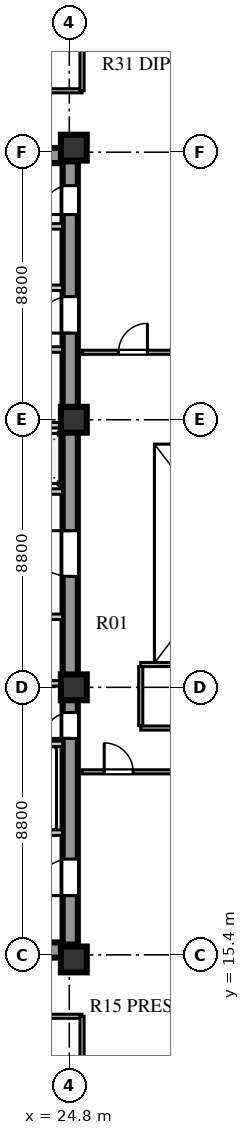
"""IFC4 building model, lengths in metres.
Left out: names, types, materials, properties, quantities, classifications, styles, units other than length and angle.
Written with IfcOpenShell. Run it as: python <this file> out.ifc"""

import sys

from ifc_helpers import new_model, si_unit, direction, frame, frame_2d, origin, origin_2d, place, context, subcontext, project, spatial, rectangle, extrude, element, fill, save


model = new_model("IFC4")
c1 = context("Model", 3, precision=1e-05, world=origin(), true_north=direction((0.0, 1.0)))
c2 = subcontext(c1, "Body", "Model", "MODEL_VIEW")
j1 = project(units=[si_unit("LENGTHUNIT", "METRE"), si_unit("PLANEANGLEUNIT", "RADIAN")], contexts=[c1])
p1 = place(None, origin())
s1 = spatial("IfcSite", under=j1, at=p1, CompositionType="ELEMENT")
p2 = place(p1, origin())
s2 = spatial("IfcBuilding", under=s1, at=p2, CompositionType="ELEMENT")
p3 = place(p2, frame((0.0, 0.0, 188.7)))
s3 = spatial("IfcBuildingStorey", under=s2, at=p3, CompositionType="ELEMENT", Elevation=188.7)
for number, where, z_axis, x_axis in (
    (1, (15.4, 15.56, 0.0), (0.0, 0.0, 1.0), (1.0, 0.0, 0.0)),
    (2, (15.4, 41.69, 0.0), (0.0, 0.0, 1.0), (1.0, 0.0, 0.0)),
):
    element("IfcWall", number, at=place(p3, frame(where, z_axis=z_axis, x_axis=x_axis)), inside=s3, PredefinedType="SHEAR", context=c2, shape_type="SweptSolid", body=[
        extrude(rectangle(XDim=9.68, YDim=0.5, at=frame_2d((4.84, 0.0))), origin(), (0.0, 0.0, 1.0), 3.6),
    ])
p4 = place(p3, frame((24.83, 15.74, 0.0), z_axis=(0.0, 0.0, 1.0), x_axis=(0.0, 1.0, 0.0)))
e3 = element("IfcWall", 3, at=p4, inside=s3, PredefinedType="SHEAR", context=c2, shape_type="SweptSolid", body=[
    extrude(rectangle(XDim=25.76, YDim=0.5, at=frame_2d((12.88, 0.0))), origin(), (0.0, 0.0, 1.0), 3.6),
])
p5 = place(p4, frame((1.61, 0.0, 0.0)))
e4 = element("IfcOpeningElement", 4, at=p5, cuts=e3, PredefinedType="OPENING", context=c2, shape_type="SweptSolid", body=[
    extrude(rectangle(XDim=1.2, YDim=2.1, at=frame_2d((0.6, 1.05))), frame((0.0, 0.26, 0.0), z_axis=(0.0, -1.0, 0.0), x_axis=(1.0, 0.0, 0.0)), (0.0, 0.0, 1.0), 0.52),
])
p6 = place(p4, frame((6.78, 0.0, 0.0)))
e5 = element("IfcOpeningElement", 5, at=p6, cuts=e3, PredefinedType="OPENING", context=c2, shape_type="SweptSolid", body=[
    extrude(rectangle(XDim=0.85, YDim=2.06, at=frame_2d((0.425, 1.03))), frame((0.0, 0.26, 0.0), z_axis=(0.0, -1.0, 0.0), x_axis=(1.0, 0.0, 0.0)), (0.0, 0.0, 1.0), 0.52),
])
p7 = place(p4, frame((12.11, 0.0, 0.0)))
e6 = element("IfcOpeningElement", 6, at=p7, cuts=e3, PredefinedType="OPENING", context=c2, shape_type="SweptSolid", body=[
    extrude(rectangle(XDim=1.5, YDim=2.12, at=frame_2d((0.75, 1.06))), frame((0.0, 0.26, 0.0), z_axis=(0.0, -1.0, 0.0), x_axis=(1.0, 0.0, 0.0)), (0.0, 0.0, 1.0), 0.52),
])
p8 = place(p4, frame((20.11, 0.0, 0.0)))
e7 = element("IfcOpeningElement", 7, at=p8, cuts=e3, PredefinedType="OPENING", context=c2, shape_type="SweptSolid", body=[
    extrude(rectangle(XDim=1.2, YDim=2.12, at=frame_2d((0.6, 1.06))), frame((0.0, 0.26, 0.0), z_axis=(0.0, -1.0, 0.0), x_axis=(1.0, 0.0, 0.0)), (0.0, 0.0, 1.0), 0.52),
])
p9 = place(p4, frame((24.01, 0.0, 0.0)))
e8 = element("IfcOpeningElement", 8, at=p9, cuts=e3, PredefinedType="OPENING", context=c2, shape_type="SweptSolid", body=[
    extrude(rectangle(XDim=0.95, YDim=2.1, at=frame_2d((0.475, 1.05))), frame((0.0, 0.26, 0.0), z_axis=(0.0, -1.0, 0.0), x_axis=(1.0, 0.0, 0.0)), (0.0, 0.0, 1.0), 0.52),
])
for number, where, z_axis, x_axis in (
    (9, (24.95, 15.25, 0.0), (0.0, 0.0, 1.0), (1.0, 0.0, 0.0)),
    (10, (24.95, 24.2, 0.0), (0.0, 0.0, 1.0), (1.0, 0.0, 0.0)),
    (11, (24.95, 33.0, 0.0), (0.0, 0.0, 1.0), (1.0, 0.0, 0.0)),
    (12, (24.95, 41.95, 0.0), (0.0, 0.0, 1.0), (1.0, 0.0, 0.0)),
):
    element("IfcColumn", number, at=place(p3, frame(where, z_axis=z_axis, x_axis=x_axis)), inside=s3, PredefinedType="COLUMN", context=c2, shape_type="SweptSolid", body=[
        extrude(rectangle(XDim=0.85, YDim=0.85, at=origin_2d()), origin(), (0.0, 0.0, 1.0), 3.6),
    ])
p10 = place(p3, frame((19.64, 19.42, 0.0), z_axis=(0.0, 0.0, 1.0), x_axis=(1.0, 0.0, 0.0)))
e13 = element("IfcWall", 13, at=p10, inside=s3, PredefinedType="SOLIDWALL", context=c2, shape_type="SweptSolid", body=[
    extrude(rectangle(XDim=4.94, YDim=0.18, at=frame_2d((2.47, 0.0))), origin(), (0.0, 0.0, 1.0), 3.6),
])
p11 = place(p10, frame((0.72, 0.0, 0.0)))
e14 = element("IfcOpeningElement", 14, at=p11, cuts=e13, PredefinedType="OPENING", context=c2, shape_type="SweptSolid", body=[
    extrude(rectangle(XDim=1.1, YDim=2.1, at=frame_2d((0.55, 1.05))), frame((0.0, 0.1, 0.0), z_axis=(0.0, -1.0, 0.0), x_axis=(1.0, 0.0, 0.0)), (0.0, 0.0, 1.0), 0.2),
])
p12 = place(p10, frame((3.02, 0.0, 0.0)))
e15 = element("IfcOpeningElement", 15, at=p12, cuts=e13, PredefinedType="OPENING", context=c2, shape_type="SweptSolid", body=[
    extrude(rectangle(XDim=1.1, YDim=2.1, at=frame_2d((0.55, 1.05))), frame((0.0, 0.1, 0.0), z_axis=(0.0, -1.0, 0.0), x_axis=(1.0, 0.0, 0.0)), (0.0, 0.0, 1.0), 0.2),
])
p13 = place(p3, frame((19.64, 22.34, 0.0), z_axis=(0.0, 0.0, 1.0), x_axis=(1.0, 0.0, 0.0)))
e16 = element("IfcWall", 16, at=p13, inside=s3, PredefinedType="SOLIDWALL", context=c2, shape_type="SweptSolid", body=[
    extrude(rectangle(XDim=4.94, YDim=0.18, at=frame_2d((2.47, 0.0))), origin(), (0.0, 0.0, 1.0), 3.6),
])
p14 = place(p3, frame((15.9, 26.52, 0.0), z_axis=(0.0, 0.0, 1.0), x_axis=(1.0, 0.0, 0.0)))
e17 = element("IfcWall", 17, at=p14, inside=s3, PredefinedType="SOLIDWALL", context=c2, shape_type="SweptSolid", body=[
    extrude(rectangle(XDim=8.68, YDim=0.18, at=frame_2d((4.34, 0.0))), origin(), (0.0, 0.0, 1.0), 3.6),
])
p15 = place(p14, frame((2.5, 0.0, 0.0)))
e18 = element("IfcOpeningElement", 18, at=p15, cuts=e17, PredefinedType="OPENING", context=c2, shape_type="SweptSolid", body=[
    extrude(rectangle(XDim=0.95, YDim=2.1, at=frame_2d((0.475, 1.05))), frame((0.0, 0.1, 0.0), z_axis=(0.0, -1.0, 0.0), x_axis=(1.0, 0.0, 0.0)), (0.0, 0.0, 1.0), 0.2),
])
p16 = place(p14, frame((6.0, 0.0, 0.0)))
e19 = element("IfcOpeningElement", 19, at=p16, cuts=e17, PredefinedType="OPENING", context=c2, shape_type="SweptSolid", body=[
    extrude(rectangle(XDim=0.95, YDim=2.1, at=frame_2d((0.475, 1.05))), frame((0.0, 0.1, 0.0), z_axis=(0.0, -1.0, 0.0), x_axis=(1.0, 0.0, 0.0)), (0.0, 0.0, 1.0), 0.2),
])
p17 = place(p3, frame((15.9, 24.33, 0.0), z_axis=(0.0, 0.0, 1.0), x_axis=(1.0, 0.0, 0.0)))
e20 = element("IfcWall", 20, at=p17, inside=s3, PredefinedType="SOLIDWALL", context=c2, shape_type="SweptSolid", body=[
    extrude(rectangle(XDim=8.68, YDim=0.18, at=frame_2d((4.34, 0.0))), origin(), (0.0, 0.0, 1.0), 2.95),
])
p18 = place(p3, frame((15.9, 30.64, 0.0), z_axis=(0.0, 0.0, 1.0), x_axis=(1.0, 0.0, 0.0)))
e21 = element("IfcWall", 21, at=p18, inside=s3, PredefinedType="SOLIDWALL", context=c2, shape_type="SweptSolid", body=[
    extrude(rectangle(XDim=8.68, YDim=0.18, at=frame_2d((4.34, 0.0))), origin(), (0.0, 0.0, 1.0), 3.6),
])
p19 = place(p18, frame((1.76, 0.0, 0.0)))
e22 = element("IfcOpeningElement", 22, at=p19, cuts=e21, PredefinedType="OPENING", context=c2, shape_type="SweptSolid", body=[
    extrude(rectangle(XDim=1.0, YDim=2.1, at=frame_2d((0.5, 1.05))), frame((0.0, 0.1, 0.0), z_axis=(0.0, -1.0, 0.0), x_axis=(1.0, 0.0, 0.0)), (0.0, 0.0, 1.0), 0.2),
])
p20 = place(p18, frame((3.6, 0.0, 0.0)))
e23 = element("IfcOpeningElement", 23, at=p20, cuts=e21, PredefinedType="OPENING", context=c2, shape_type="SweptSolid", body=[
    extrude(rectangle(XDim=1.0, YDim=2.1, at=frame_2d((0.5, 1.05))), frame((0.0, 0.1, 0.0), z_axis=(0.0, -1.0, 0.0), x_axis=(1.0, 0.0, 0.0)), (0.0, 0.0, 1.0), 0.2),
])
p21 = place(p18, frame((5.44, 0.0, 0.0)))
e24 = element("IfcOpeningElement", 24, at=p21, cuts=e21, PredefinedType="OPENING", context=c2, shape_type="SweptSolid", body=[
    extrude(rectangle(XDim=1.0, YDim=2.1, at=frame_2d((0.5, 1.05))), frame((0.0, 0.1, 0.0), z_axis=(0.0, -1.0, 0.0), x_axis=(1.0, 0.0, 0.0)), (0.0, 0.0, 1.0), 0.2),
])
p22 = place(p18, frame((7.28, 0.0, 0.0)))
e25 = element("IfcOpeningElement", 25, at=p22, cuts=e21, PredefinedType="OPENING", context=c2, shape_type="SweptSolid", body=[
    extrude(rectangle(XDim=1.0, YDim=2.1, at=frame_2d((0.5, 1.05))), frame((0.0, 0.1, 0.0), z_axis=(0.0, -1.0, 0.0), x_axis=(1.0, 0.0, 0.0)), (0.0, 0.0, 1.0), 0.2),
])
p23 = place(p3, frame((15.9, 32.82, 0.0), z_axis=(0.0, 0.0, 1.0), x_axis=(1.0, 0.0, 0.0)))
e26 = element("IfcWall", 26, at=p23, inside=s3, PredefinedType="SOLIDWALL", context=c2, shape_type="SweptSolid", body=[
    extrude(rectangle(XDim=8.68, YDim=0.18, at=frame_2d((4.34, 0.0))), origin(), (0.0, 0.0, 1.0), 2.95),
])
p24 = place(p3, frame((22.02, 35.31, 0.0), z_axis=(0.0, 0.0, 1.0), x_axis=(1.0, 0.0, 0.0)))
e27 = element("IfcWall", 27, at=p24, inside=s3, PredefinedType="SOLIDWALL", context=c2, shape_type="SweptSolid", body=[
    extrude(rectangle(XDim=2.56, YDim=0.18, at=frame_2d((1.28, 0.0))), origin(), (0.0, 0.0, 1.0), 3.6),
])
p25 = place(p24, frame((0.55, 0.0, 0.0)))
e28 = element("IfcOpeningElement", 28, at=p25, cuts=e27, PredefinedType="OPENING", context=c2, shape_type="SweptSolid", body=[
    extrude(rectangle(XDim=1.0, YDim=2.1, at=frame_2d((0.5, 1.05))), frame((0.0, 0.1, 0.0), z_axis=(0.0, -1.0, 0.0), x_axis=(1.0, 0.0, 0.0)), (0.0, 0.0, 1.0), 0.2),
])
p26 = place(p3, frame((19.64, 37.34, 0.0), z_axis=(0.0, 0.0, 1.0), x_axis=(1.0, 0.0, 0.0)))
e29 = element("IfcWall", 29, at=p26, inside=s3, PredefinedType="SOLIDWALL", context=c2, shape_type="SweptSolid", body=[
    extrude(rectangle(XDim=4.94, YDim=0.18, at=frame_2d((2.47, 0.0))), origin(), (0.0, 0.0, 1.0), 3.6),
])
p27 = place(p26, frame((0.45, 0.0, 0.0)))
e30 = element("IfcOpeningElement", 30, at=p27, cuts=e29, PredefinedType="OPENING", context=c2, shape_type="SweptSolid", body=[
    extrude(rectangle(XDim=1.0, YDim=2.1, at=frame_2d((0.5, 1.05))), frame((0.0, 0.1, 0.0), z_axis=(0.0, -1.0, 0.0), x_axis=(1.0, 0.0, 0.0)), (0.0, 0.0, 1.0), 0.2),
])
p28 = place(p26, frame((2.5, 0.0, 0.0)))
e31 = element("IfcOpeningElement", 31, at=p28, cuts=e29, PredefinedType="OPENING", context=c2, shape_type="SweptSolid", body=[
    extrude(rectangle(XDim=1.0, YDim=2.1, at=frame_2d((0.5, 1.05))), frame((0.0, 0.1, 0.0), z_axis=(0.0, -1.0, 0.0), x_axis=(1.0, 0.0, 0.0)), (0.0, 0.0, 1.0), 0.2),
])
p29 = place(p3, frame((19.64, 39.36, 0.0), z_axis=(0.0, 0.0, 1.0), x_axis=(1.0, 0.0, 0.0)))
e32 = element("IfcWall", 32, at=p29, inside=s3, PredefinedType="SOLIDWALL", context=c2, shape_type="SweptSolid", body=[
    extrude(rectangle(XDim=4.94, YDim=0.18, at=frame_2d((2.47, 0.0))), origin(), (0.0, 0.0, 1.0), 3.6),
])
p30 = place(p3, frame((25.22, 21.42, 0.0), z_axis=(0.0, 0.0, 1.0), x_axis=(1.0, 0.0, 0.0)))
e33 = element("IfcWall", 33, at=p30, inside=s3, PredefinedType="PARTITIONING", context=c2, shape_type="SweptSolid", body=[
    extrude(rectangle(XDim=15.6, YDim=0.135, at=frame_2d((7.8, 0.0))), origin(), (0.0, 0.0, 1.0), 3.25),
])
p31 = place(p30, frame((0.73, 0.0, 0.0)))
e34 = element("IfcOpeningElement", 34, at=p31, cuts=e33, PredefinedType="OPENING", context=c2, shape_type="SweptSolid", body=[
    extrude(rectangle(XDim=0.95, YDim=2.1, at=frame_2d((0.475, 1.05))), frame((0.0, 0.078, 0.0), z_axis=(0.0, -1.0, 0.0), x_axis=(1.0, 0.0, 0.0)), (0.0, 0.0, 1.0), 0.155),
])
p32 = place(p30, frame((9.43, 0.0, 0.0)))
e35 = element("IfcOpeningElement", 35, at=p32, cuts=e33, PredefinedType="OPENING", context=c2, shape_type="SweptSolid", body=[
    extrude(rectangle(XDim=0.95, YDim=2.1, at=frame_2d((0.475, 1.05))), frame((0.0, 0.078, 0.0), z_axis=(0.0, -1.0, 0.0), x_axis=(1.0, 0.0, 0.0)), (0.0, 0.0, 1.0), 0.155),
])
p33 = place(p3, frame((27.15, 22.86, 0.0), z_axis=(0.0, 0.0, 1.0), x_axis=(1.0, 0.0, 0.0)))
e36 = element("IfcWall", 36, at=p33, inside=s3, PredefinedType="PARTITIONING", context=c2, shape_type="SweptSolid", body=[
    extrude(rectangle(XDim=13.67, YDim=0.135, at=frame_2d((6.835, 0.0))), origin(), (0.0, 0.0, 1.0), 3.6),
])
p34 = place(p33, frame((2.2, 0.0, 0.0)))
e37 = element("IfcOpeningElement", 37, at=p34, cuts=e36, PredefinedType="OPENING", context=c2, shape_type="SweptSolid", body=[
    extrude(rectangle(XDim=0.9, YDim=2.08, at=frame_2d((0.45, 1.04))), frame((0.0, 0.078, 0.0), z_axis=(0.0, -1.0, 0.0), x_axis=(1.0, 0.0, 0.0)), (0.0, 0.0, 1.0), 0.155),
])
p35 = place(p3, frame((25.22, 35.22, 0.0), z_axis=(0.0, 0.0, 1.0), x_axis=(1.0, 0.0, 0.0)))
e38 = element("IfcWall", 38, at=p35, inside=s3, PredefinedType="PARTITIONING", context=c2, shape_type="SweptSolid", body=[
    extrude(rectangle(XDim=9.5, YDim=0.135, at=frame_2d((4.75, 0.0))), origin(), (0.0, 0.0, 1.0), 3.6),
])
p36 = place(p35, frame((1.2, 0.0, 0.0)))
e39 = element("IfcOpeningElement", 39, at=p36, cuts=e38, PredefinedType="OPENING", context=c2, shape_type="SweptSolid", body=[
    extrude(rectangle(XDim=0.95, YDim=2.1, at=frame_2d((0.475, 1.05))), frame((0.0, 0.078, 0.0), z_axis=(0.0, -1.0, 0.0), x_axis=(1.0, 0.0, 0.0)), (0.0, 0.0, 1.0), 0.155),
])
p37 = place(p3, frame((13.39, 13.38, 0.0), z_axis=(0.0, 0.0, 1.0), x_axis=(1.0, 0.0, 0.0)))
e40 = element("IfcWall", 40, at=p37, inside=s3, PredefinedType="PARTITIONING", context=c2, shape_type="SweptSolid", body=[
    extrude(rectangle(XDim=11.83, YDim=0.135, at=frame_2d((5.915, 0.0))), origin(), (0.0, 0.0, 1.0), 3.6),
])
p38 = place(p37, frame((4.76, 0.0, 0.0)))
e41 = element("IfcOpeningElement", 41, at=p38, cuts=e40, PredefinedType="OPENING", context=c2, shape_type="SweptSolid", body=[
    extrude(rectangle(XDim=1.0, YDim=2.08, at=frame_2d((0.5, 1.04))), frame((0.0, 0.078, 0.0), z_axis=(0.0, -1.0, 0.0), x_axis=(1.0, 0.0, 0.0)), (0.0, 0.0, 1.0), 0.155),
])
p39 = place(p3, frame((25.22, 7.88, 0.0), z_axis=(0.0, 0.0, 1.0), x_axis=(0.0, 1.0, 0.0)))
e42 = element("IfcWall", 42, at=p39, inside=s3, PredefinedType="PARTITIONING", context=c2, shape_type="SweptSolid", body=[
    extrude(rectangle(XDim=5.5, YDim=0.135, at=frame_2d((2.75, 0.0))), origin(), (0.0, 0.0, 1.0), 3.15),
])
p40 = place(p3, frame((13.39, 43.82, 0.0), z_axis=(0.0, 0.0, 1.0), x_axis=(1.0, 0.0, 0.0)))
e43 = element("IfcWall", 43, at=p40, inside=s3, PredefinedType="PARTITIONING", context=c2, shape_type="SweptSolid", body=[
    extrude(rectangle(XDim=11.83, YDim=0.135, at=frame_2d((5.915, 0.0))), origin(), (0.0, 0.0, 1.0), 3.6),
])
p41 = place(p40, frame((4.76, 0.0, 0.0)))
e44 = element("IfcOpeningElement", 44, at=p41, cuts=e43, PredefinedType="OPENING", context=c2, shape_type="SweptSolid", body=[
    extrude(rectangle(XDim=1.0, YDim=2.08, at=frame_2d((0.5, 1.04))), frame((0.0, 0.078, 0.0), z_axis=(0.0, -1.0, 0.0), x_axis=(1.0, 0.0, 0.0)), (0.0, 0.0, 1.0), 0.155),
])
p42 = place(p3, frame((25.22, 43.82, 0.0), z_axis=(0.0, 0.0, 1.0), x_axis=(0.0, 1.0, 0.0)))
e45 = element("IfcWall", 45, at=p42, inside=s3, PredefinedType="PARTITIONING", context=c2, shape_type="SweptSolid", body=[
    extrude(rectangle(XDim=5.5, YDim=0.135, at=frame_2d((2.75, 0.0))), origin(), (0.0, 0.0, 1.0), 3.15),
])
p43 = place(p3, frame((27.15, 24.95, 0.0), z_axis=(0.0, 0.0, 1.0), x_axis=(1.0, 0.0, 0.0)))
e46 = element("IfcWall", 46, at=p43, inside=s3, PredefinedType="PARTITIONING", context=c2, shape_type="SweptSolid", body=[
    extrude(rectangle(XDim=9.67, YDim=0.135, at=frame_2d((4.835, 0.0))), origin(), (0.0, 0.0, 1.0), 3.05),
])
p44 = place(p3, frame((27.15, 22.94, 0.0), z_axis=(0.0, 0.0, 1.0), x_axis=(0.0, 1.0, 0.0)))
e47 = element("IfcWall", 47, at=p44, inside=s3, PredefinedType="PARTITIONING", context=c2, shape_type="SweptSolid", body=[
    extrude(rectangle(XDim=1.94, YDim=0.135, at=frame_2d((0.97, 0.0))), origin(), (0.0, 0.0, 1.0), 3.6),
])
p45 = place(p5, frame((1.2, 0.0, 0.0), z_axis=(0.0, 0.0, 1.0), x_axis=(-1.0, 0.0, 0.0)))
e48 = element("IfcDoor", 48, at=p45, inside=s3, OperationType="SINGLE_SWING_RIGHT", PredefinedType="DOOR", context=c2, shape_type="SweptSolid", body=[
    extrude(rectangle(XDim=1.2, YDim=2.1, at=frame_2d((0.6, 1.05))), frame((0.0, 0.025, 0.0), z_axis=(0.0, -1.0, 0.0), x_axis=(1.0, 0.0, 0.0)), (0.0, 0.0, 1.0), 0.05),
])
fill(e4, e48)
p46 = place(p6, frame((0.85, 0.0, 0.0), z_axis=(0.0, 0.0, 1.0), x_axis=(-1.0, 0.0, 0.0)))
e49 = element("IfcDoor", 49, at=p46, inside=s3, OperationType="SINGLE_SWING_RIGHT", PredefinedType="DOOR", context=c2, shape_type="SweptSolid", body=[
    extrude(rectangle(XDim=0.85, YDim=2.06, at=frame_2d((0.425, 1.03))), frame((0.0, 0.025, 0.0), z_axis=(0.0, -1.0, 0.0), x_axis=(1.0, 0.0, 0.0)), (0.0, 0.0, 1.0), 0.05),
])
fill(e5, e49)
p47 = place(p7, frame((1.5, 0.0, 0.0), z_axis=(0.0, 0.0, 1.0), x_axis=(-1.0, 0.0, 0.0)))
e50 = element("IfcDoor", 50, at=p47, inside=s3, OperationType="SINGLE_SWING_LEFT", PredefinedType="DOOR", context=c2, shape_type="SweptSolid", body=[
    extrude(rectangle(XDim=1.5, YDim=2.12, at=frame_2d((0.75, 1.06))), frame((0.0, 0.025, 0.0), z_axis=(0.0, -1.0, 0.0), x_axis=(1.0, 0.0, 0.0)), (0.0, 0.0, 1.0), 0.05),
])
fill(e6, e50)
p48 = place(p8, frame((1.2, 0.0, 0.0), z_axis=(0.0, 0.0, 1.0), x_axis=(-1.0, 0.0, 0.0)))
e51 = element("IfcDoor", 51, at=p48, inside=s3, OperationType="SINGLE_SWING_RIGHT", PredefinedType="DOOR", context=c2, shape_type="SweptSolid", body=[
    extrude(rectangle(XDim=1.2, YDim=2.12, at=frame_2d((0.6, 1.06))), frame((0.0, 0.025, 0.0), z_axis=(0.0, -1.0, 0.0), x_axis=(1.0, 0.0, 0.0)), (0.0, 0.0, 1.0), 0.05),
])
fill(e7, e51)
p49 = place(p9, frame((0.95, 0.0, 0.0), z_axis=(0.0, 0.0, 1.0), x_axis=(-1.0, 0.0, 0.0)))
e52 = element("IfcDoor", 52, at=p49, inside=s3, OperationType="SINGLE_SWING_RIGHT", PredefinedType="DOOR", context=c2, shape_type="SweptSolid", body=[
    extrude(rectangle(XDim=0.95, YDim=2.1, at=frame_2d((0.475, 1.05))), frame((0.0, 0.025, 0.0), z_axis=(0.0, -1.0, 0.0), x_axis=(1.0, 0.0, 0.0)), (0.0, 0.0, 1.0), 0.05),
])
fill(e8, e52)
p50 = place(p31, frame((0.95, 0.0, 0.0), z_axis=(0.0, 0.0, 1.0), x_axis=(-1.0, 0.0, 0.0)))
e53 = element("IfcDoor", 53, at=p50, inside=s3, OperationType="SINGLE_SWING_RIGHT", PredefinedType="DOOR", context=c2, shape_type="SweptSolid", body=[
    extrude(rectangle(XDim=0.95, YDim=2.1, at=frame_2d((0.475, 1.05))), frame((0.0, 0.025, 0.0), z_axis=(0.0, -1.0, 0.0), x_axis=(1.0, 0.0, 0.0)), (0.0, 0.0, 1.0), 0.05),
])
fill(e34, e53)
p51 = place(p36, origin())
e54 = element("IfcDoor", 54, at=p51, inside=s3, OperationType="SINGLE_SWING_RIGHT", PredefinedType="DOOR", context=c2, shape_type="SweptSolid", body=[
    extrude(rectangle(XDim=0.95, YDim=2.1, at=frame_2d((0.475, 1.05))), frame((0.0, 0.025, 0.0), z_axis=(0.0, -1.0, 0.0), x_axis=(1.0, 0.0, 0.0)), (0.0, 0.0, 1.0), 0.05),
])
fill(e39, e54)
save(model, sys.argv[1])
